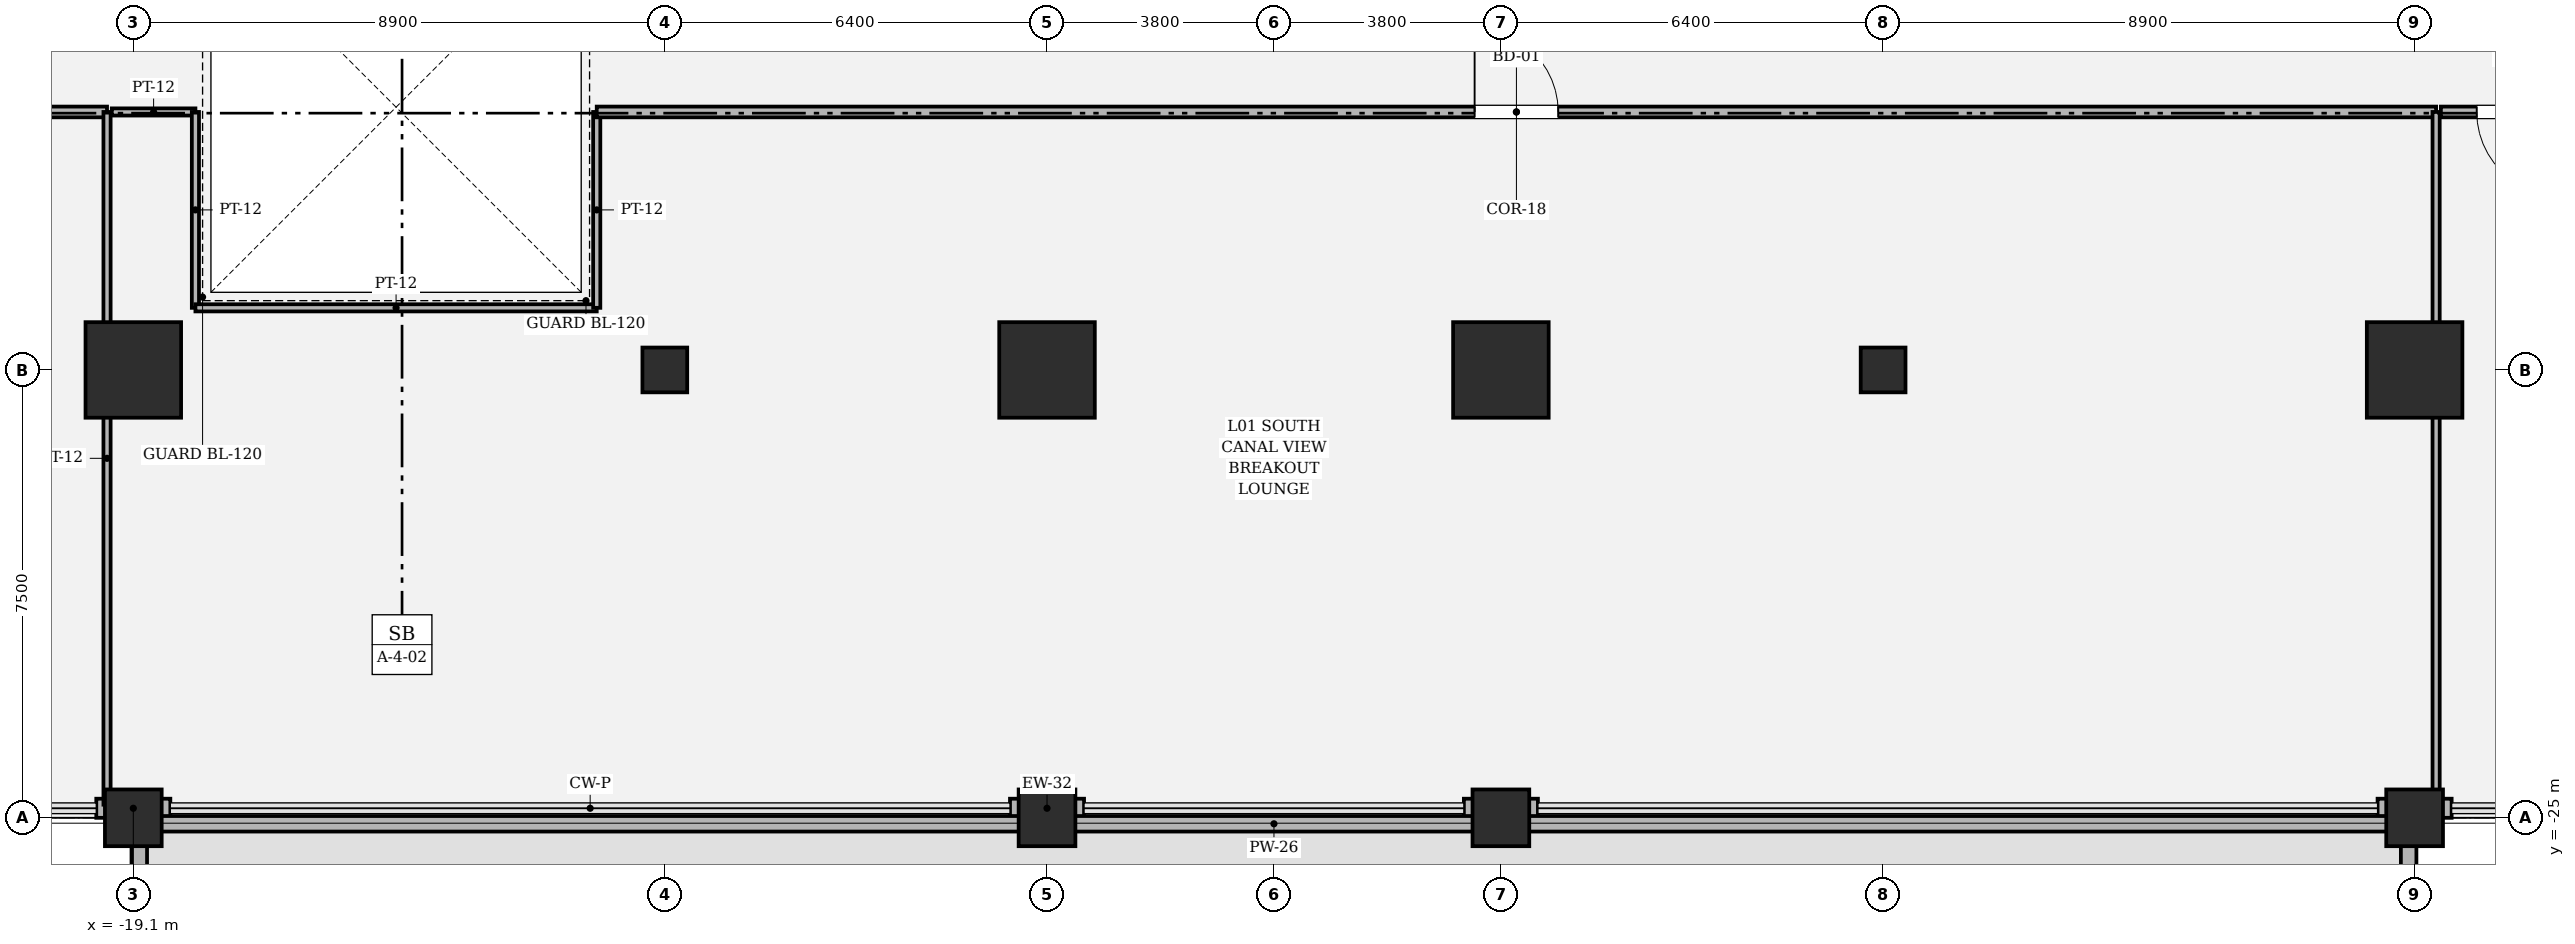
"""IFC4 building model, lengths in metres.
Left out: names, types, materials, properties, quantities, classifications, styles, units other than length and angle.
Written with IfcOpenShell. Run it as: python <this file> out.ifc"""

import sys

from ifc_helpers import new_model, si_unit, direction, frame, frame_2d, origin, origin_2d, place, context, subcontext, project, spatial, rectangle, hollow_rectangle, circle, extrude, element, fill, save


model = new_model("IFC4")
c1 = context("Model", 3, precision=1e-05, world=origin(), true_north=direction((0.0, 1.0)))
c2 = subcontext(c1, "Body", "Model", "MODEL_VIEW")
j1 = project(units=[si_unit("LENGTHUNIT", "METRE"), si_unit("PLANEANGLEUNIT", "RADIAN")], contexts=[c1])
p1 = place(None, origin())
s1 = spatial("IfcSite", under=j1, at=p1, CompositionType="ELEMENT")
p2 = place(p1, origin())
s2 = spatial("IfcBuilding", under=s1, at=p2, CompositionType="ELEMENT")
p3 = place(p2, frame((0.0, 0.0, 6.0)))
s3 = spatial("IfcBuildingStorey", under=s2, at=p3, CompositionType="ELEMENT", Elevation=6.0)
for number, where, z_axis, x_axis in (
    (1, (-19.1, -17.5, 0.0), (0.0, 0.0, 1.0), (1.0, 0.0, 0.0)),
    (2, (-3.8, -17.5, 0.0), (0.0, 0.0, 1.0), (1.0, 0.0, 0.0)),
    (3, (3.8, -17.5, 0.0), (0.0, 0.0, 1.0), (1.0, 0.0, 0.0)),
    (4, (19.1, -17.5, 0.0), (0.0, 0.0, 1.0), (1.0, 0.0, 0.0)),
):
    element("IfcColumn", number, at=place(p3, frame(where, z_axis=z_axis, x_axis=x_axis)), inside=s3, PredefinedType="COLUMN", context=c2, shape_type="SweptSolid", body=[
        extrude(hollow_rectangle(XDim=1.6, YDim=1.6, WallThickness=0.05, at=origin_2d()), origin(), (0.0, 0.0, 1.0), 5.4),
    ])
for number, where, z_axis, x_axis in (
    (5, (-19.1, -25.0, 0.0), (0.0, 0.0, 1.0), (1.0, 0.0, 0.0)),
    (6, (-3.8, -25.0, 0.0), (0.0, 0.0, 1.0), (1.0, 0.0, 0.0)),
    (7, (3.8, -25.0, 0.0), (0.0, 0.0, 1.0), (1.0, 0.0, 0.0)),
    (8, (19.1, -25.0, 0.0), (0.0, 0.0, 1.0), (1.0, 0.0, 0.0)),
):
    element("IfcColumn", number, at=place(p3, frame(where, z_axis=z_axis, x_axis=x_axis)), inside=s3, PredefinedType="COLUMN", context=c2, shape_type="SweptSolid", body=[
        extrude(rectangle(XDim=0.95, YDim=0.95, at=origin_2d()), origin(), (0.0, 0.0, 1.0), 5.4),
    ])
for number, where, z_axis, x_axis in (
    (9, (-10.2, -17.5, 0.0), (0.0, 0.0, 1.0), (1.0, 0.0, 0.0)),
    (10, (10.2, -17.5, 0.0), (0.0, 0.0, 1.0), (1.0, 0.0, 0.0)),
):
    element("IfcColumn", number, at=place(p3, frame(where, z_axis=z_axis, x_axis=x_axis)), inside=s3, PredefinedType="PILASTER", context=c2, shape_type="SweptSolid", body=[
        extrude(circle(Radius=0.375, at=origin_2d()), origin(), (0.0, 0.0, 1.0), 5.4),
    ])
for number, where, z_axis, x_axis in (
    (11, (-19.72, -24.84, 0.0), (0.0, 0.0, 1.0), (1.0, 0.0, 0.0)),
    (12, (-4.42, -24.84, 0.0), (0.0, 0.0, 1.0), (1.0, 0.0, 0.0)),
    (13, (3.18, -24.84, 0.0), (0.0, 0.0, 1.0), (1.0, 0.0, 0.0)),
    (14, (18.48, -24.84, 0.0), (0.0, 0.0, 1.0), (1.0, 0.0, 0.0)),
):
    element("IfcWall", number, at=place(p3, frame(where, z_axis=z_axis, x_axis=x_axis)), inside=s3, PredefinedType="SOLIDWALL", context=c2, shape_type="SweptSolid", body=[
        extrude(rectangle(XDim=1.24, YDim=0.32, at=frame_2d((0.62, 0.0))), origin(), (0.0, 0.0, 1.0), 4.414),
    ])
for number, where, z_axis, x_axis in (
    (15, (-19.0, -25.1, 0.0), (0.0, 0.0, 1.0), (0.0, -1.0, 0.0)),
    (16, (19.0, -27.62, 0.0), (0.0, 0.0, 1.0), (0.0, 1.0, 0.0)),
):
    element("IfcWall", number, at=place(p3, frame(where, z_axis=z_axis, x_axis=x_axis)), inside=s3, PredefinedType="PARAPET", context=c2, shape_type="SweptSolid", body=[
        extrude(rectangle(XDim=2.52, YDim=0.26, at=frame_2d((1.26, 0.0))), origin(), (0.0, 0.0, 1.0), 1.15),
    ])
p4 = place(p3, frame((19.0, -25.1, 0.0), z_axis=(0.0, 0.0, 1.0), x_axis=(-1.0, 0.0, 0.0)))
e17 = element("IfcWall", 17, at=p4, inside=s3, PredefinedType="PARAPET", context=c2, shape_type="SweptSolid", body=[
    extrude(rectangle(XDim=38.0, YDim=0.26, at=frame_2d((19.0, 0.0))), origin(), (0.0, 0.0, 1.0), 1.15),
])
p5 = place(p3, frame((-30.38, -13.18, 0.0), z_axis=(0.0, 0.0, 1.0), x_axis=(1.0, 0.0, 0.0)))
e18 = element("IfcWall", 18, at=p5, inside=s3, PredefinedType="PARTITIONING", context=c2, shape_type="SweptSolid", body=[
    extrude(rectangle(XDim=10.84, YDim=0.18, at=frame_2d((5.42, 0.0))), origin(), (0.0, 0.0, 1.0), 4.414),
])
p6 = place(p5, frame((4.72, 0.0, 0.0)))
e19 = element("IfcOpeningElement", 19, at=p6, cuts=e18, PredefinedType="OPENING", context=c2, shape_type="SweptSolid", body=[
    extrude(rectangle(XDim=1.4, YDim=2.25, at=frame_2d((0.7, 1.125))), frame((0.0, 0.1, 0.0), z_axis=(0.0, -1.0, 0.0), x_axis=(1.0, 0.0, 0.0)), (0.0, 0.0, 1.0), 0.2),
])
p7 = place(p3, frame((-19.54, -13.18, 0.0), z_axis=(0.0, 0.0, 1.0), x_axis=(0.0, -1.0, 0.0)))
e20 = element("IfcWall", 20, at=p7, inside=s3, PredefinedType="PARTITIONING", context=c2, shape_type="SweptSolid", body=[
    extrude(rectangle(XDim=11.6, YDim=0.12, at=frame_2d((5.8, 0.0))), origin(), (0.0, 0.0, 1.0), 4.414),
])
p8 = place(p3, frame((-19.46, -13.18, 0.0), z_axis=(0.0, 0.0, 1.0), x_axis=(1.0, 0.0, 0.0)))
e21 = element("IfcWall", 21, at=p8, inside=s3, PredefinedType="PARTITIONING", context=c2, shape_type="SweptSolid", body=[
    extrude(rectangle(XDim=1.4, YDim=0.12, at=frame_2d((0.7, 0.0))), origin(), (0.0, 0.0, 1.0), 4.414),
])
p9 = place(p3, frame((-18.06, -13.18, 0.0), z_axis=(0.0, 0.0, 1.0), x_axis=(0.0, -1.0, 0.0)))
e22 = element("IfcWall", 22, at=p9, inside=s3, PredefinedType="PARTITIONING", context=c2, shape_type="SweptSolid", body=[
    extrude(rectangle(XDim=3.28, YDim=0.12, at=frame_2d((1.64, 0.0))), origin(), (0.0, 0.0, 1.0), 5.12),
])
p10 = place(p3, frame((-18.06, -16.46, 0.0), z_axis=(0.0, 0.0, 1.0), x_axis=(1.0, 0.0, 0.0)))
e23 = element("IfcWall", 23, at=p10, inside=s3, PredefinedType="PARTITIONING", context=c2, shape_type="SweptSolid", body=[
    extrude(rectangle(XDim=6.72, YDim=0.12, at=frame_2d((3.36, 0.0))), origin(), (0.0, 0.0, 1.0), 5.12),
])
p11 = place(p3, frame((-11.34, -16.46, 0.0), z_axis=(0.0, 0.0, 1.0), x_axis=(0.0, 1.0, 0.0)))
e24 = element("IfcWall", 24, at=p11, inside=s3, PredefinedType="PARTITIONING", context=c2, shape_type="SweptSolid", body=[
    extrude(rectangle(XDim=3.28, YDim=0.12, at=frame_2d((1.64, 0.0))), origin(), (0.0, 0.0, 1.0), 5.12),
])
p12 = place(p3, frame((-11.34, -13.18, 0.0), z_axis=(0.0, 0.0, 1.0), x_axis=(1.0, 0.0, 0.0)))
e25 = element("IfcWall", 25, at=p12, inside=s3, PredefinedType="PARTITIONING", context=c2, shape_type="SweptSolid", body=[
    extrude(rectangle(XDim=30.8, YDim=0.18, at=frame_2d((15.4, 0.0))), origin(), (0.0, 0.0, 1.0), 4.414),
])
p13 = place(p12, frame((14.7, 0.0, 0.0)))
e26 = element("IfcOpeningElement", 26, at=p13, cuts=e25, PredefinedType="OPENING", context=c2, shape_type="SweptSolid", body=[
    extrude(rectangle(XDim=1.4, YDim=2.25, at=frame_2d((0.7, 1.125))), frame((0.0, 0.1, 0.0), z_axis=(0.0, -1.0, 0.0), x_axis=(1.0, 0.0, 0.0)), (0.0, 0.0, 1.0), 0.2),
])
p14 = place(p3, frame((19.46, -13.18, 0.0), z_axis=(0.0, 0.0, 1.0), x_axis=(0.0, -1.0, 0.0)))
e27 = element("IfcWall", 27, at=p14, inside=s3, PredefinedType="PARTITIONING", context=c2, shape_type="SweptSolid", body=[
    extrude(rectangle(XDim=11.6, YDim=0.12, at=frame_2d((5.8, 0.0))), origin(), (0.0, 0.0, 1.0), 4.414),
])
p15 = place(p3, frame((19.54, -13.18, 0.0), z_axis=(0.0, 0.0, 1.0), x_axis=(1.0, 0.0, 0.0)))
e28 = element("IfcWall", 28, at=p15, inside=s3, PredefinedType="PARTITIONING", context=c2, shape_type="SweptSolid", body=[
    extrude(rectangle(XDim=2.6, YDim=0.18, at=frame_2d((1.3, 0.0))), origin(), (0.0, 0.0, 1.0), 5.12),
])
p16 = place(p15, frame((0.6, 0.0, 0.0)))
e29 = element("IfcOpeningElement", 29, at=p16, cuts=e28, PredefinedType="OPENING", context=c2, shape_type="SweptSolid", body=[
    extrude(rectangle(XDim=1.4, YDim=2.25, at=frame_2d((0.7, 1.125))), frame((0.0, 0.1, 0.0), z_axis=(0.0, -1.0, 0.0), x_axis=(1.0, 0.0, 0.0)), (0.0, 0.0, 1.0), 0.2),
])
p17 = place(p13, origin())
e30 = element("IfcDoor", 30, at=p17, inside=s3, OperationType="SINGLE_SWING_LEFT", PredefinedType="DOOR", context=c2, shape_type="SweptSolid", body=[
    extrude(rectangle(XDim=1.4, YDim=2.25, at=frame_2d((0.7, 1.125))), frame((0.0, 0.025, 0.0), z_axis=(0.0, -1.0, 0.0), x_axis=(1.0, 0.0, 0.0)), (0.0, 0.0, 1.0), 0.05),
])
fill(e26, e30)
p18 = place(p16, origin())
e31 = element("IfcDoor", 31, at=p18, inside=s3, OperationType="SINGLE_SWING_RIGHT", PredefinedType="DOOR", context=c2, shape_type="SweptSolid", body=[
    extrude(rectangle(XDim=1.4, YDim=2.25, at=frame_2d((0.7, 1.125))), frame((0.0, 0.025, 0.0), z_axis=(0.0, -1.0, 0.0), x_axis=(1.0, 0.0, 0.0)), (0.0, 0.0, 1.0), 0.05),
])
fill(e29, e31)
save(model, sys.argv[1])
